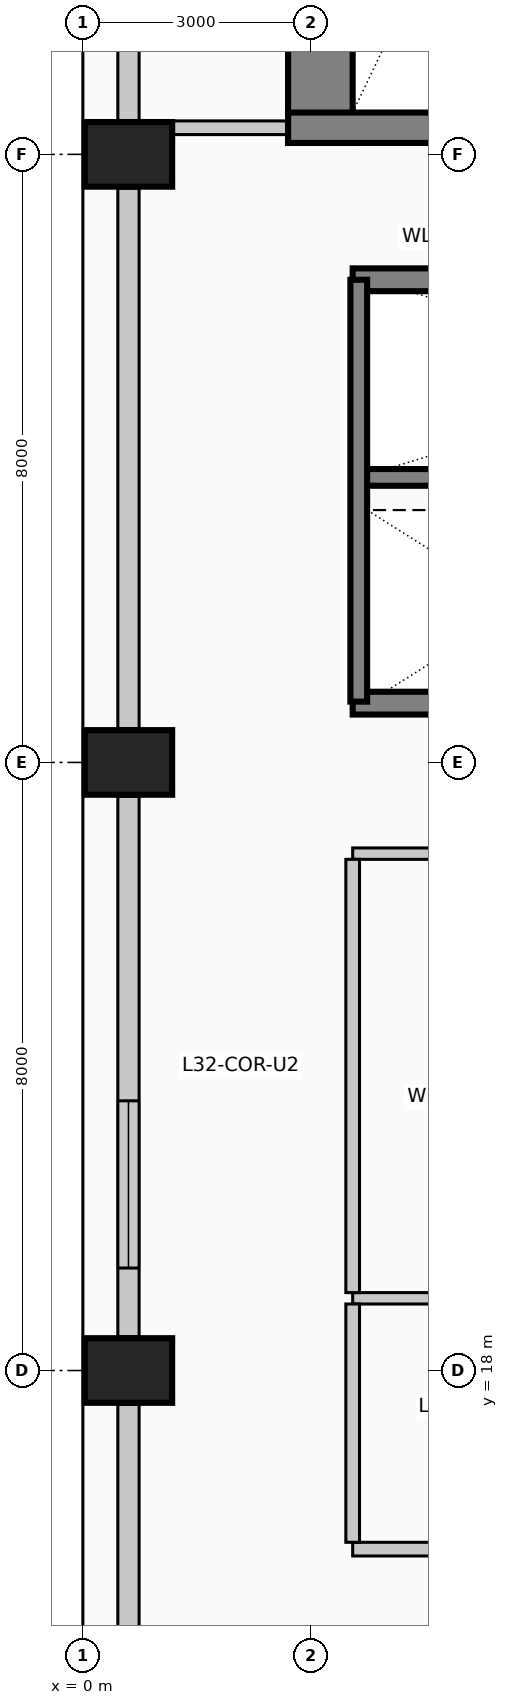
"""IFC4 building model, lengths in metres.
Left out: names, types, materials, properties, quantities, classifications, styles, units other than length and angle.
Written with IfcOpenShell. Run it as: python <this file> out.ifc"""

import sys

from ifc_helpers import new_model, si_unit, direction, frame, frame_2d, origin, origin_2d, place, context, subcontext, project, spatial, rectangle, extrude, element, fill, save


model = new_model("IFC4")
c1 = context("Model", 3, precision=1e-05, world=origin(), true_north=direction((0.0, 1.0)))
c2 = subcontext(c1, "Body", "Model", "MODEL_VIEW")
j1 = project(units=[si_unit("LENGTHUNIT", "METRE"), si_unit("PLANEANGLEUNIT", "RADIAN")], contexts=[c1])
p1 = place(None, origin())
s1 = spatial("IfcSite", under=j1, at=p1, CompositionType="ELEMENT")
p2 = place(p1, origin())
s2 = spatial("IfcBuilding", under=s1, at=p2, CompositionType="ELEMENT")
p3 = place(p2, frame((0.0, 0.0, 132.6)))
s3 = spatial("IfcBuildingStorey", under=s2, at=p3, CompositionType="ELEMENT", Elevation=132.6)
p4 = place(p3, frame((3.125, 34.15, 0.0), z_axis=(0.0, 0.0, 1.0), x_axis=(0.0, 1.0, 0.0)))
e1 = element("IfcWall", 1, at=p4, inside=s3, PredefinedType="SHEAR", context=c2, shape_type="SweptSolid", body=[
    extrude(rectangle(XDim=9.13, YDim=0.85, at=frame_2d((4.565, 0.0))), origin(), (0.0, 0.0, 1.0), 4.0),
])
p5 = place(p3, frame((2.7, 34.35, 0.0), z_axis=(0.0, 0.0, 1.0), x_axis=(1.0, 0.0, 0.0)))
e2 = element("IfcWall", 2, at=p5, inside=s3, PredefinedType="SHEAR", context=c2, shape_type="SweptSolid", body=[
    extrude(rectangle(XDim=5.01, YDim=0.4, at=frame_2d((2.505, 0.0))), origin(), (0.0, 0.0, 1.0), 4.0),
])
p6 = place(p5, frame((2.4, 0.0, 0.0)))
e3 = element("IfcOpeningElement", 3, at=p6, cuts=e2, PredefinedType="OPENING", context=c2, shape_type="SweptSolid", body=[
    extrude(rectangle(XDim=1.15, YDim=2.2, at=frame_2d((0.575, 1.1))), frame((0.0, 0.21, 0.0), z_axis=(0.0, -1.0, 0.0), x_axis=(1.0, 0.0, 0.0)), (0.0, 0.0, 1.0), 0.42),
])
for number, where, z_axis, x_axis in (
    (4, (0.6, 18.0, 0.0), (0.0, 0.0, 1.0), (0.0, 1.0, 0.0)),
    (5, (0.6, 26.0, 0.0), (0.0, 0.0, 1.0), (0.0, 1.0, 0.0)),
    (6, (0.6, 34.0, 0.0), (0.0, 0.0, 1.0), (0.0, 1.0, 0.0)),
):
    element("IfcColumn", number, at=place(p3, frame(where, z_axis=z_axis, x_axis=x_axis)), inside=s3, PredefinedType="COLUMN", context=c2, shape_type="SweptSolid", body=[
        extrude(rectangle(XDim=0.85, YDim=1.15, at=origin_2d()), origin(), (0.0, 0.0, 1.0), 4.0),
    ])
p7 = place(p3, frame((0.6, 10.445, 0.0), z_axis=(0.0, 0.0, 1.0), x_axis=(0.0, 1.0, 0.0)))
e7 = element("IfcWall", 7, at=p7, inside=s3, PredefinedType="SOLIDWALL", context=c2, shape_type="SweptSolid", body=[
    extrude(rectangle(XDim=7.11, YDim=0.28, at=frame_2d((3.555, 0.0))), origin(), (0.0, 0.0, 1.0), 2.875),
])
p8 = place(p3, frame((0.6, 18.445, 0.0), z_axis=(0.0, 0.0, 1.0), x_axis=(0.0, 1.0, 0.0)))
e8 = element("IfcWall", 8, at=p8, inside=s3, PredefinedType="SOLIDWALL", context=c2, shape_type="SweptSolid", body=[
    extrude(rectangle(XDim=7.11, YDim=0.28, at=frame_2d((3.555, 0.0))), origin(), (0.0, 0.0, 1.0), 2.875),
])
p9 = place(p8, frame((0.903, 0.0, 0.5)))
e9 = element("IfcOpeningElement", 9, at=p9, cuts=e8, PredefinedType="OPENING", context=c2, shape_type="SweptSolid", body=[
    extrude(rectangle(XDim=2.2, YDim=1.95, at=frame_2d((1.1, 0.975))), frame((0.0, 0.15, 0.0), z_axis=(0.0, -1.0, 0.0), x_axis=(1.0, 0.0, 0.0)), (0.0, 0.0, 1.0), 0.3),
])
p10 = place(p3, frame((0.6, 26.445, 0.0), z_axis=(0.0, 0.0, 1.0), x_axis=(0.0, 1.0, 0.0)))
e10 = element("IfcWall", 10, at=p10, inside=s3, PredefinedType="SOLIDWALL", context=c2, shape_type="SweptSolid", body=[
    extrude(rectangle(XDim=7.11, YDim=0.28, at=frame_2d((3.555, 0.0))), origin(), (0.0, 0.0, 1.0), 2.875),
])
p11 = place(p3, frame((0.6, 34.445, 0.0), z_axis=(0.0, 0.0, 1.0), x_axis=(0.0, 1.0, 0.0)))
e11 = element("IfcWall", 11, at=p11, inside=s3, PredefinedType="SOLIDWALL", context=c2, shape_type="SweptSolid", body=[
    extrude(rectangle(XDim=7.51, YDim=0.28, at=frame_2d((3.755, 0.0))), origin(), (0.0, 0.0, 1.0), 2.875),
])
for number, where, z_axis, x_axis in (
    (12, (3.55, 32.35, 0.0), (0.0, 0.0, 1.0), (1.0, 0.0, 0.0)),
    (13, (5.65, 26.78, 0.0), (0.0, 0.0, 1.0), (-1.0, 0.0, 0.0)),
):
    element("IfcWall", number, at=place(p3, frame(where, z_axis=z_axis, x_axis=x_axis)), inside=s3, PredefinedType="SOLIDWALL", context=c2, shape_type="SweptSolid", body=[
        extrude(rectangle(XDim=2.1, YDim=0.3, at=frame_2d((1.05, 0.0))), origin(), (0.0, 0.0, 1.0), 4.0),
    ])
p12 = place(p3, frame((3.55, 29.75, 0.0), z_axis=(0.0, 0.0, 1.0), x_axis=(1.0, 0.0, 0.0)))
e14 = element("IfcWall", 14, at=p12, inside=s3, PredefinedType="SOLIDWALL", context=c2, shape_type="SweptSolid", body=[
    extrude(rectangle(XDim=8.65, YDim=0.22, at=frame_2d((4.325, 0.0))), origin(), (0.0, 0.0, 1.0), 4.0),
])
p13 = place(p3, frame((3.63, 26.8, 0.0), z_axis=(0.0, 0.0, 1.0), x_axis=(0.0, 1.0, 0.0)))
e15 = element("IfcWall", 15, at=p13, inside=s3, PredefinedType="SOLIDWALL", context=c2, shape_type="SweptSolid", body=[
    extrude(rectangle(XDim=5.55, YDim=0.22, at=frame_2d((2.775, 0.0))), origin(), (0.0, 0.0, 1.0), 4.0),
])
p14 = place(p3, frame((3.55, 15.65, 0.0), z_axis=(0.0, 0.0, 1.0), x_axis=(1.0, 0.0, 0.0)))
e16 = element("IfcWall", 16, at=p14, inside=s3, PredefinedType="PARTITIONING", context=c2, shape_type="SweptSolid", body=[
    extrude(rectangle(XDim=4.45, YDim=0.18, at=frame_2d((2.225, 0.0))), origin(), (0.0, 0.0, 1.0), 3.725),
])
p15 = place(p14, frame((1.75, 0.0, 0.0)))
e17 = element("IfcOpeningElement", 17, at=p15, cuts=e16, PredefinedType="OPENING", context=c2, shape_type="SweptSolid", body=[
    extrude(rectangle(XDim=0.95, YDim=2.15, at=frame_2d((0.475, 1.075))), frame((0.0, 0.1, 0.0), z_axis=(0.0, -1.0, 0.0), x_axis=(1.0, 0.0, 0.0)), (0.0, 0.0, 1.0), 0.2),
])
p16 = place(p3, frame((3.55, 18.95, 0.0), z_axis=(0.0, 0.0, 1.0), x_axis=(1.0, 0.0, 0.0)))
e18 = element("IfcWall", 18, at=p16, inside=s3, PredefinedType="PARTITIONING", context=c2, shape_type="SweptSolid", body=[
    extrude(rectangle(XDim=4.45, YDim=0.15, at=frame_2d((2.225, 0.0))), origin(), (0.0, 0.0, 1.0), 3.725),
])
p17 = place(p3, frame((3.55, 24.8, 0.0), z_axis=(0.0, 0.0, 1.0), x_axis=(1.0, 0.0, 0.0)))
e19 = element("IfcWall", 19, at=p17, inside=s3, PredefinedType="PARTITIONING", context=c2, shape_type="SweptSolid", body=[
    extrude(rectangle(XDim=6.25, YDim=0.15, at=frame_2d((3.125, 0.0))), origin(), (0.0, 0.0, 1.0), 3.725),
])
p18 = place(p17, frame((2.6, 0.0, 0.0)))
e20 = element("IfcOpeningElement", 20, at=p18, cuts=e19, PredefinedType="OPENING", context=c2, shape_type="SweptSolid", body=[
    extrude(rectangle(XDim=1.05, YDim=2.15, at=frame_2d((0.525, 1.075))), frame((0.0, 0.085, 0.0), z_axis=(0.0, -1.0, 0.0), x_axis=(1.0, 0.0, 0.0)), (0.0, 0.0, 1.0), 0.17),
])
p19 = place(p3, frame((1.175, 34.35, 0.0), z_axis=(0.0, 0.0, 1.0), x_axis=(1.0, 0.0, 0.0)))
e21 = element("IfcWall", 21, at=p19, inside=s3, PredefinedType="PARTITIONING", context=c2, shape_type="SweptSolid", body=[
    extrude(rectangle(XDim=1.525, YDim=0.18, at=frame_2d((0.762, 0.0))), origin(), (0.0, 0.0, 1.0), 3.725),
])
p20 = place(p3, frame((3.55, 15.74, 0.0), z_axis=(0.0, 0.0, 1.0), x_axis=(0.0, 1.0, 0.0)))
e22 = element("IfcWall", 22, at=p20, inside=s3, PredefinedType="PARTITIONING", context=c2, shape_type="SweptSolid", body=[
    extrude(rectangle(XDim=3.135, YDim=0.18, at=frame_2d((1.567, 0.0))), origin(), (0.0, 0.0, 1.0), 3.725),
])
p21 = place(p3, frame((3.55, 19.025, 0.0), z_axis=(0.0, 0.0, 1.0), x_axis=(0.0, 1.0, 0.0)))
e23 = element("IfcWall", 23, at=p21, inside=s3, PredefinedType="PARTITIONING", context=c2, shape_type="SweptSolid", body=[
    extrude(rectangle(XDim=5.7, YDim=0.18, at=frame_2d((2.85, 0.0))), origin(), (0.0, 0.0, 1.0), 3.725),
])
p22 = place(p9, origin())
e24 = element("IfcWindow", 24, at=p22, inside=s3, PartitioningType="SINGLE_PANEL", PredefinedType="WINDOW", context=c2, shape_type="SweptSolid", body=[
    extrude(rectangle(XDim=2.2, YDim=1.95, at=frame_2d((1.1, 0.975))), frame((0.0, 0.03, 0.0), z_axis=(0.0, -1.0, 0.0), x_axis=(1.0, 0.0, 0.0)), (0.0, 0.0, 1.0), 0.06),
])
fill(e9, e24)
save(model, sys.argv[1])
